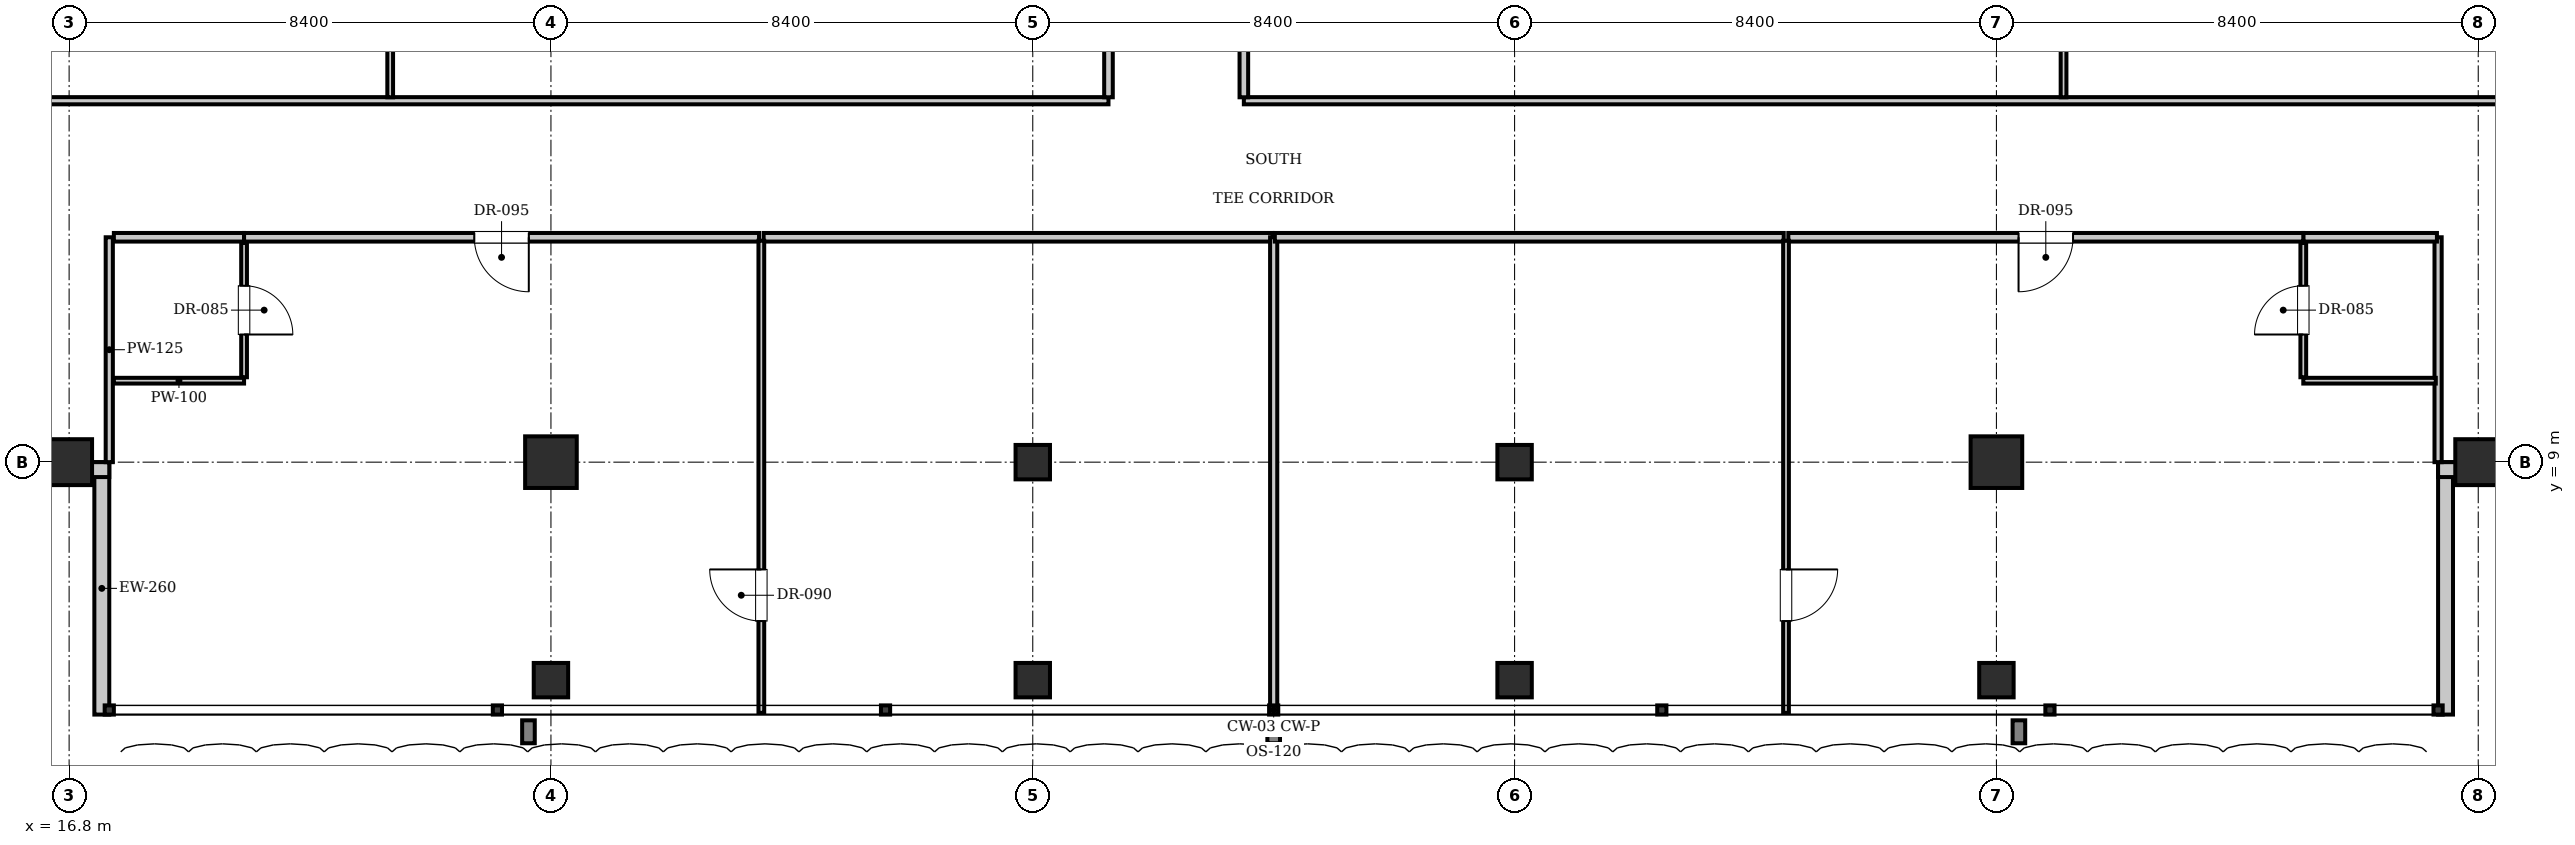
"""IFC4 building model, lengths in metres.
Left out: names, types, materials, properties, quantities, classifications, styles, units other than length and angle.
Written with IfcOpenShell. Run it as: python <this file> out.ifc"""

import sys

from ifc_helpers import new_model, si_unit, direction, frame, frame_2d, origin, origin_2d, place, context, subcontext, project, spatial, rectangle, i_section, extrude, element, fill, save


model = new_model("IFC4")
c1 = context("Model", 3, precision=1e-05, world=origin(), true_north=direction((0.0, 1.0)))
c2 = subcontext(c1, "Body", "Model", "MODEL_VIEW")
j1 = project(units=[si_unit("LENGTHUNIT", "METRE"), si_unit("PLANEANGLEUNIT", "RADIAN")], contexts=[c1])
p1 = place(None, origin())
s1 = spatial("IfcSite", under=j1, at=p1, CompositionType="ELEMENT")
p2 = place(p1, origin())
s2 = spatial("IfcBuilding", under=s1, at=p2, CompositionType="ELEMENT")
p3 = place(p2, frame((0.0, 0.0, 223.65)))
s3 = spatial("IfcBuildingStorey", under=s2, at=p3, CompositionType="ELEMENT", Elevation=223.65)
for number, where, z_axis, x_axis in (
    (1, (25.2, 9.0, 0.0), (0.0, 0.0, 1.0), (1.0, 0.0, 0.0)),
    (2, (50.4, 9.0, 0.0), (0.0, 0.0, 1.0), (1.0, 0.0, 0.0)),
):
    element("IfcColumn", number, at=place(p3, frame(where, z_axis=z_axis, x_axis=x_axis)), inside=s3, PredefinedType="COLUMN", context=c2, shape_type="SweptSolid", body=[
        extrude(rectangle(XDim=0.9, YDim=0.9, at=origin_2d()), origin(), (0.0, 0.0, 1.0), 3.85),
    ])
for number, where, z_axis, x_axis in (
    (3, (33.6, 9.0, 0.0), (0.0, 0.0, 1.0), (1.0, 0.0, 0.0)),
    (4, (42.0, 9.0, 0.0), (0.0, 0.0, 1.0), (1.0, 0.0, 0.0)),
):
    element("IfcColumn", number, at=place(p3, frame(where, z_axis=z_axis, x_axis=x_axis)), inside=s3, PredefinedType="COLUMN", context=c2, shape_type="SweptSolid", body=[
        extrude(i_section(OverallWidth=0.6, OverallDepth=0.6, WebThickness=0.025, FlangeThickness=0.038, at=origin_2d()), origin(), (0.0, 0.0, 1.0), 3.85),
    ])
for number, where, z_axis, x_axis in (
    (5, (16.8, 9.0, 0.0), (0.0, 0.0, 1.0), (1.0, 0.0, 0.0)),
    (6, (58.8, 9.0, 0.0), (0.0, 0.0, 1.0), (1.0, 0.0, 0.0)),
):
    element("IfcColumn", number, at=place(p3, frame(where, z_axis=z_axis, x_axis=x_axis)), inside=s3, PredefinedType="COLUMN", context=c2, shape_type="SweptSolid", body=[
        extrude(rectangle(XDim=0.8, YDim=0.8, at=origin_2d()), origin(), (0.0, 0.0, 1.0), 3.85),
    ])
for number, where, z_axis, x_axis in (
    (7, (25.2, 5.2, 0.0), (0.0, 0.0, 1.0), (1.0, 0.0, 0.0)),
    (8, (33.6, 5.2, 0.0), (0.0, 0.0, 1.0), (1.0, 0.0, 0.0)),
    (9, (42.0, 5.2, 0.0), (0.0, 0.0, 1.0), (1.0, 0.0, 0.0)),
    (10, (50.4, 5.2, 0.0), (0.0, 0.0, 1.0), (1.0, 0.0, 0.0)),
):
    element("IfcColumn", number, at=place(p3, frame(where, z_axis=z_axis, x_axis=x_axis)), inside=s3, PredefinedType="COLUMN", context=c2, shape_type="SweptSolid", body=[
        extrude(i_section(OverallWidth=0.6, OverallDepth=0.6, WebThickness=0.025, FlangeThickness=0.038, at=origin_2d()), origin(), (0.0, 0.0, 1.0), 3.85),
    ])
p4 = place(p3, frame((17.37, 4.6, 0.0), z_axis=(0.0, 0.0, 1.0), x_axis=(0.0, 1.0, 0.0)))
e11 = element("IfcWall", 11, at=p4, inside=s3, PredefinedType="SOLIDWALL", context=c2, shape_type="SweptSolid", body=[
    extrude(rectangle(XDim=4.4, YDim=0.26, at=frame_2d((2.2, 0.0))), origin(), (0.0, 0.0, 1.0), 3.55),
])
p5 = place(p3, frame((17.5, 8.87, 0.0), z_axis=(0.0, 0.0, 1.0), x_axis=(-1.0, 0.0, 0.0)))
e12 = element("IfcWall", 12, at=p5, inside=s3, PredefinedType="SOLIDWALL", context=c2, shape_type="SweptSolid", body=[
    extrude(rectangle(XDim=4.4, YDim=0.26, at=frame_2d((2.2, 0.0))), origin(), (0.0, 0.0, 1.0), 3.011),
])
p6 = place(p3, frame((58.23, 9.0, 0.0), z_axis=(0.0, 0.0, 1.0), x_axis=(0.0, -1.0, 0.0)))
e13 = element("IfcWall", 13, at=p6, inside=s3, PredefinedType="SOLIDWALL", context=c2, shape_type="SweptSolid", body=[
    extrude(rectangle(XDim=4.4, YDim=0.26, at=frame_2d((2.2, 0.0))), origin(), (0.0, 0.0, 1.0), 3.55),
])
p7 = place(p3, frame((62.5, 8.87, 0.0), z_axis=(0.0, 0.0, 1.0), x_axis=(-1.0, 0.0, 0.0)))
e14 = element("IfcWall", 14, at=p7, inside=s3, PredefinedType="SOLIDWALL", context=c2, shape_type="SweptSolid", body=[
    extrude(rectangle(XDim=4.4, YDim=0.26, at=frame_2d((2.2, 0.0))), origin(), (0.0, 0.0, 1.0), 3.011),
])
for number, where, z_axis, x_axis in (
    (15, (17.5, 9.0, 0.0), (0.0, 0.0, 1.0), (0.0, 1.0, 0.0)),
    (16, (58.1, 9.0, 0.0), (0.0, 0.0, 1.0), (0.0, 1.0, 0.0)),
):
    element("IfcWall", number, at=place(p3, frame(where, z_axis=z_axis, x_axis=x_axis)), inside=s3, PredefinedType="PARTITIONING", context=c2, shape_type="SweptSolid", body=[
        extrude(rectangle(XDim=3.92, YDim=0.125, at=frame_2d((1.96, 0.0))), origin(), (0.0, 0.0, 1.0), 3.55),
    ])
p8 = place(p3, frame((17.58, 12.92, 0.0), z_axis=(0.0, 0.0, 1.0), x_axis=(1.0, 0.0, 0.0)))
e17 = element("IfcWall", 17, at=p8, inside=s3, PredefinedType="PARTITIONING", context=c2, shape_type="SweptSolid", body=[
    extrude(rectangle(XDim=2.27, YDim=0.15, at=frame_2d((1.135, 0.0))), origin(), (0.0, 0.0, 1.0), 3.55),
])
p9 = place(p3, frame((17.58, 10.42, 0.0), z_axis=(0.0, 0.0, 1.0), x_axis=(1.0, 0.0, 0.0)))
e18 = element("IfcWall", 18, at=p9, inside=s3, PredefinedType="PARTITIONING", context=c2, shape_type="SweptSolid", body=[
    extrude(rectangle(XDim=2.27, YDim=0.1, at=frame_2d((1.135, 0.0))), origin(), (0.0, 0.0, 1.0), 3.55),
])
p10 = place(p3, frame((19.85, 10.48, 0.0), z_axis=(0.0, 0.0, 1.0), x_axis=(0.0, 1.0, 0.0)))
e19 = element("IfcWall", 19, at=p10, inside=s3, PredefinedType="PARTITIONING", context=c2, shape_type="SweptSolid", body=[
    extrude(rectangle(XDim=2.34, YDim=0.1, at=frame_2d((1.17, 0.0))), origin(), (0.0, 0.0, 1.0), 3.55),
])
p11 = place(p10, frame((0.745, 0.0, 0.0)))
e20 = element("IfcOpeningElement", 20, at=p11, cuts=e19, PredefinedType="OPENING", context=c2, shape_type="SweptSolid", body=[
    extrude(rectangle(XDim=0.85, YDim=2.1, at=frame_2d((0.425, 1.05))), frame((0.0, 0.06, 0.0), z_axis=(0.0, -1.0, 0.0), x_axis=(1.0, 0.0, 0.0)), (0.0, 0.0, 1.0), 0.12),
])
p12 = place(p3, frame((19.85, 12.92, 0.0), z_axis=(0.0, 0.0, 1.0), x_axis=(1.0, 0.0, 0.0)))
e21 = element("IfcWall", 21, at=p12, inside=s3, PredefinedType="PARTITIONING", context=c2, shape_type="SweptSolid", body=[
    extrude(rectangle(XDim=8.978, YDim=0.15, at=frame_2d((4.489, 0.0))), origin(), (0.0, 0.0, 1.0), 3.55),
])
p13 = place(p12, frame((4.014, 0.0, 0.0)))
e22 = element("IfcOpeningElement", 22, at=p13, cuts=e21, PredefinedType="OPENING", context=c2, shape_type="SweptSolid", body=[
    extrude(rectangle(XDim=0.95, YDim=2.15, at=frame_2d((0.475, 1.075))), frame((0.0, 0.085, 0.0), z_axis=(0.0, -1.0, 0.0), x_axis=(1.0, 0.0, 0.0)), (0.0, 0.0, 1.0), 0.17),
])
p14 = place(p3, frame((28.908, 12.92, 0.0), z_axis=(0.0, 0.0, 1.0), x_axis=(1.0, 0.0, 0.0)))
e23 = element("IfcWall", 23, at=p14, inside=s3, PredefinedType="PARTITIONING", context=c2, shape_type="SweptSolid", body=[
    extrude(rectangle(XDim=8.872, YDim=0.15, at=frame_2d((4.436, 0.0))), origin(), (0.0, 0.0, 1.0), 3.55),
])
p15 = place(p3, frame((28.868, 4.63, 0.0), z_axis=(0.0, 0.0, 1.0), x_axis=(0.0, 1.0, 0.0)))
e24 = element("IfcWall", 24, at=p15, inside=s3, PredefinedType="PARTITIONING", context=c2, shape_type="SweptSolid", body=[
    extrude(rectangle(XDim=8.23, YDim=0.1, at=frame_2d((4.115, 0.0))), origin(), (0.0, 0.0, 1.0), 3.55),
])
p16 = place(p15, frame((1.6, 0.0, 0.0)))
e25 = element("IfcOpeningElement", 25, at=p16, cuts=e24, PredefinedType="OPENING", context=c2, shape_type="SweptSolid", body=[
    extrude(rectangle(XDim=0.9, YDim=2.1, at=frame_2d((0.45, 1.05))), frame((0.0, 0.06, 0.0), z_axis=(0.0, -1.0, 0.0), x_axis=(1.0, 0.0, 0.0)), (0.0, 0.0, 1.0), 0.12),
])
p17 = place(p3, frame((37.8, 4.7, 0.0), z_axis=(0.0, 0.0, 1.0), x_axis=(0.0, 1.0, 0.0)))
e26 = element("IfcWall", 26, at=p17, inside=s3, PredefinedType="PARTITIONING", context=c2, shape_type="SweptSolid", body=[
    extrude(rectangle(XDim=8.22, YDim=0.125, at=frame_2d((4.11, 0.0))), origin(), (0.0, 0.0, 1.0), 3.233),
])
p18 = place(p3, frame((55.75, 12.92, 0.0), z_axis=(0.0, 0.0, 1.0), x_axis=(1.0, 0.0, 0.0)))
e27 = element("IfcWall", 27, at=p18, inside=s3, PredefinedType="PARTITIONING", context=c2, shape_type="SweptSolid", body=[
    extrude(rectangle(XDim=2.33, YDim=0.15, at=frame_2d((1.165, 0.0))), origin(), (0.0, 0.0, 1.0), 3.55),
])
p19 = place(p3, frame((55.75, 10.42, 0.0), z_axis=(0.0, 0.0, 1.0), x_axis=(1.0, 0.0, 0.0)))
e28 = element("IfcWall", 28, at=p19, inside=s3, PredefinedType="PARTITIONING", context=c2, shape_type="SweptSolid", body=[
    extrude(rectangle(XDim=2.31, YDim=0.1, at=frame_2d((1.155, 0.0))), origin(), (0.0, 0.0, 1.0), 3.55),
])
p20 = place(p3, frame((55.75, 10.48, 0.0), z_axis=(0.0, 0.0, 1.0), x_axis=(0.0, 1.0, 0.0)))
e29 = element("IfcWall", 29, at=p20, inside=s3, PredefinedType="PARTITIONING", context=c2, shape_type="SweptSolid", body=[
    extrude(rectangle(XDim=2.34, YDim=0.1, at=frame_2d((1.17, 0.0))), origin(), (0.0, 0.0, 1.0), 3.55),
])
p21 = place(p20, frame((0.745, 0.0, 0.0)))
e30 = element("IfcOpeningElement", 30, at=p21, cuts=e29, PredefinedType="OPENING", context=c2, shape_type="SweptSolid", body=[
    extrude(rectangle(XDim=0.85, YDim=2.1, at=frame_2d((0.425, 1.05))), frame((0.0, 0.06, 0.0), z_axis=(0.0, -1.0, 0.0), x_axis=(1.0, 0.0, 0.0)), (0.0, 0.0, 1.0), 0.12),
])
p22 = place(p3, frame((37.82, 12.92, 0.0), z_axis=(0.0, 0.0, 1.0), x_axis=(1.0, 0.0, 0.0)))
e31 = element("IfcWall", 31, at=p22, inside=s3, PredefinedType="PARTITIONING", context=c2, shape_type="SweptSolid", body=[
    extrude(rectangle(XDim=8.872, YDim=0.15, at=frame_2d((4.436, 0.0))), origin(), (0.0, 0.0, 1.0), 3.55),
])
p23 = place(p3, frame((46.772, 12.92, 0.0), z_axis=(0.0, 0.0, 1.0), x_axis=(1.0, 0.0, 0.0)))
e32 = element("IfcWall", 32, at=p23, inside=s3, PredefinedType="PARTITIONING", context=c2, shape_type="SweptSolid", body=[
    extrude(rectangle(XDim=8.978, YDim=0.15, at=frame_2d((4.489, 0.0))), origin(), (0.0, 0.0, 1.0), 3.55),
])
p24 = place(p23, frame((4.014, 0.0, 0.0)))
e33 = element("IfcOpeningElement", 33, at=p24, cuts=e32, PredefinedType="OPENING", context=c2, shape_type="SweptSolid", body=[
    extrude(rectangle(XDim=0.95, YDim=2.15, at=frame_2d((0.475, 1.075))), frame((0.0, 0.085, 0.0), z_axis=(0.0, -1.0, 0.0), x_axis=(1.0, 0.0, 0.0)), (0.0, 0.0, 1.0), 0.17),
])
p25 = place(p3, frame((46.732, 4.63, 0.0), z_axis=(0.0, 0.0, 1.0), x_axis=(0.0, 1.0, 0.0)))
e34 = element("IfcWall", 34, at=p25, inside=s3, PredefinedType="PARTITIONING", context=c2, shape_type="SweptSolid", body=[
    extrude(rectangle(XDim=8.23, YDim=0.1, at=frame_2d((4.115, 0.0))), origin(), (0.0, 0.0, 1.0), 3.55),
])
p26 = place(p25, frame((1.6, 0.0, 0.0)))
e35 = element("IfcOpeningElement", 35, at=p26, cuts=e34, PredefinedType="OPENING", context=c2, shape_type="SweptSolid", body=[
    extrude(rectangle(XDim=0.9, YDim=2.1, at=frame_2d((0.45, 1.05))), frame((0.0, 0.06, 0.0), z_axis=(0.0, -1.0, 0.0), x_axis=(1.0, 0.0, 0.0)), (0.0, 0.0, 1.0), 0.12),
])
p27 = place(p3, frame((13.2, 15.3, 0.0), z_axis=(0.0, 0.0, 1.0), x_axis=(1.0, 0.0, 0.0)))
e36 = element("IfcWall", 36, at=p27, inside=s3, PredefinedType="PARTITIONING", context=c2, shape_type="SweptSolid", body=[
    extrude(rectangle(XDim=21.72, YDim=0.125, at=frame_2d((10.86, 0.0))), origin(), (0.0, 0.0, 1.0), 3.55),
])
p28 = place(p3, frame((37.28, 15.3, 0.0), z_axis=(0.0, 0.0, 1.0), x_axis=(1.0, 0.0, 0.0)))
e37 = element("IfcWall", 37, at=p28, inside=s3, PredefinedType="PARTITIONING", context=c2, shape_type="SweptSolid", body=[
    extrude(rectangle(XDim=25.12, YDim=0.125, at=frame_2d((12.56, 0.0))), origin(), (0.0, 0.0, 1.0), 3.55),
])
p29 = place(p3, frame((34.92, 15.36, 0.0), z_axis=(0.0, 0.0, 1.0), x_axis=(0.0, 1.0, 0.0)))
e38 = element("IfcWall", 38, at=p29, inside=s3, PredefinedType="PARTITIONING", context=c2, shape_type="SweptSolid", body=[
    extrude(rectangle(XDim=5.49, YDim=0.15, at=frame_2d((2.745, 0.0))), origin(), (0.0, 0.0, 1.0), 3.55),
])
p30 = place(p29, frame((3.35, 0.0, 0.0)))
e39 = element("IfcOpeningElement", 39, at=p30, cuts=e38, PredefinedType="OPENING", context=c2, shape_type="SweptSolid", body=[
    extrude(rectangle(XDim=0.95, YDim=2.15, at=frame_2d((0.475, 1.075))), frame((0.0, 0.085, 0.0), z_axis=(0.0, -1.0, 0.0), x_axis=(1.0, 0.0, 0.0)), (0.0, 0.0, 1.0), 0.17),
])
p31 = place(p3, frame((22.398, 15.36, 0.0), z_axis=(0.0, 0.0, 1.0), x_axis=(0.0, 1.0, 0.0)))
e40 = element("IfcWall", 40, at=p31, inside=s3, PredefinedType="PARTITIONING", context=c2, shape_type="SweptSolid", body=[
    extrude(rectangle(XDim=7.78, YDim=0.1, at=frame_2d((3.89, 0.0))), origin(), (0.0, 0.0, 1.0), 3.55),
])
p32 = place(p31, frame((3.44, 0.0, 0.0)))
e41 = element("IfcOpeningElement", 41, at=p32, cuts=e40, PredefinedType="OPENING", context=c2, shape_type="SweptSolid", body=[
    extrude(rectangle(XDim=0.9, YDim=2.1, at=frame_2d((0.45, 1.05))), frame((0.0, 0.06, 0.0), z_axis=(0.0, -1.0, 0.0), x_axis=(1.0, 0.0, 0.0)), (0.0, 0.0, 1.0), 0.12),
])
p33 = place(p3, frame((37.28, 15.36, 0.0), z_axis=(0.0, 0.0, 1.0), x_axis=(0.0, 1.0, 0.0)))
e42 = element("IfcWall", 42, at=p33, inside=s3, PredefinedType="PARTITIONING", context=c2, shape_type="SweptSolid", body=[
    extrude(rectangle(XDim=5.49, YDim=0.15, at=frame_2d((2.745, 0.0))), origin(), (0.0, 0.0, 1.0), 3.55),
])
p34 = place(p33, frame((2.27, 0.0, 0.0)))
e43 = element("IfcOpeningElement", 43, at=p34, cuts=e42, PredefinedType="OPENING", context=c2, shape_type="SweptSolid", body=[
    extrude(rectangle(XDim=0.95, YDim=2.15, at=frame_2d((0.475, 1.075))), frame((0.0, 0.085, 0.0), z_axis=(0.0, -1.0, 0.0), x_axis=(1.0, 0.0, 0.0)), (0.0, 0.0, 1.0), 0.17),
])
p35 = place(p3, frame((51.57, 15.36, 0.0), z_axis=(0.0, 0.0, 1.0), x_axis=(0.0, 1.0, 0.0)))
e44 = element("IfcWall", 44, at=p35, inside=s3, PredefinedType="PARTITIONING", context=c2, shape_type="SweptSolid", body=[
    extrude(rectangle(XDim=7.78, YDim=0.1, at=frame_2d((3.89, 0.0))), origin(), (0.0, 0.0, 1.0), 3.55),
])
p36 = place(p35, frame((3.44, 0.0, 0.0)))
e45 = element("IfcOpeningElement", 45, at=p36, cuts=e44, PredefinedType="OPENING", context=c2, shape_type="SweptSolid", body=[
    extrude(rectangle(XDim=0.9, YDim=2.1, at=frame_2d((0.45, 1.05))), frame((0.0, 0.06, 0.0), z_axis=(0.0, -1.0, 0.0), x_axis=(1.0, 0.0, 0.0)), (0.0, 0.0, 1.0), 0.12),
])
p37 = place(p11, frame((0.85, 0.0, 0.0), z_axis=(0.0, 0.0, 1.0), x_axis=(-1.0, 0.0, 0.0)))
e46 = element("IfcDoor", 46, at=p37, inside=s3, OperationType="SINGLE_SWING_RIGHT", PredefinedType="DOOR", context=c2, shape_type="SweptSolid", body=[
    extrude(rectangle(XDim=0.85, YDim=2.1, at=frame_2d((0.425, 1.05))), frame((0.0, 0.025, 0.0), z_axis=(0.0, -1.0, 0.0), x_axis=(1.0, 0.0, 0.0)), (0.0, 0.0, 1.0), 0.05),
])
fill(e20, e46)
p38 = place(p13, frame((0.95, 0.0, 0.0), z_axis=(0.0, 0.0, 1.0), x_axis=(-1.0, 0.0, 0.0)))
e47 = element("IfcDoor", 47, at=p38, inside=s3, OperationType="SINGLE_SWING_LEFT", PredefinedType="DOOR", context=c2, shape_type="SweptSolid", body=[
    extrude(rectangle(XDim=0.95, YDim=2.15, at=frame_2d((0.475, 1.075))), frame((0.0, 0.025, 0.0), z_axis=(0.0, -1.0, 0.0), x_axis=(1.0, 0.0, 0.0)), (0.0, 0.0, 1.0), 0.05),
])
fill(e22, e47)
p39 = place(p16, origin())
e48 = element("IfcDoor", 48, at=p39, inside=s3, OperationType="SINGLE_SWING_RIGHT", PredefinedType="DOOR", context=c2, shape_type="SweptSolid", body=[
    extrude(rectangle(XDim=0.9, YDim=2.1, at=frame_2d((0.45, 1.05))), frame((0.0, 0.025, 0.0), z_axis=(0.0, -1.0, 0.0), x_axis=(1.0, 0.0, 0.0)), (0.0, 0.0, 1.0), 0.05),
])
fill(e25, e48)
p40 = place(p21, origin())
e49 = element("IfcDoor", 49, at=p40, inside=s3, OperationType="SINGLE_SWING_LEFT", PredefinedType="DOOR", context=c2, shape_type="SweptSolid", body=[
    extrude(rectangle(XDim=0.85, YDim=2.1, at=frame_2d((0.425, 1.05))), frame((0.0, 0.025, 0.0), z_axis=(0.0, -1.0, 0.0), x_axis=(1.0, 0.0, 0.0)), (0.0, 0.0, 1.0), 0.05),
])
fill(e30, e49)
p41 = place(p24, frame((0.95, 0.0, 0.0), z_axis=(0.0, 0.0, 1.0), x_axis=(-1.0, 0.0, 0.0)))
e50 = element("IfcDoor", 50, at=p41, inside=s3, OperationType="SINGLE_SWING_RIGHT", PredefinedType="DOOR", context=c2, shape_type="SweptSolid", body=[
    extrude(rectangle(XDim=0.95, YDim=2.15, at=frame_2d((0.475, 1.075))), frame((0.0, 0.025, 0.0), z_axis=(0.0, -1.0, 0.0), x_axis=(1.0, 0.0, 0.0)), (0.0, 0.0, 1.0), 0.05),
])
fill(e33, e50)
p42 = place(p26, frame((0.9, 0.0, 0.0), z_axis=(0.0, 0.0, 1.0), x_axis=(-1.0, 0.0, 0.0)))
e51 = element("IfcDoor", 51, at=p42, inside=s3, OperationType="SINGLE_SWING_LEFT", PredefinedType="DOOR", context=c2, shape_type="SweptSolid", body=[
    extrude(rectangle(XDim=0.9, YDim=2.1, at=frame_2d((0.45, 1.05))), frame((0.0, 0.025, 0.0), z_axis=(0.0, -1.0, 0.0), x_axis=(1.0, 0.0, 0.0)), (0.0, 0.0, 1.0), 0.05),
])
fill(e35, e51)
save(model, sys.argv[1])
